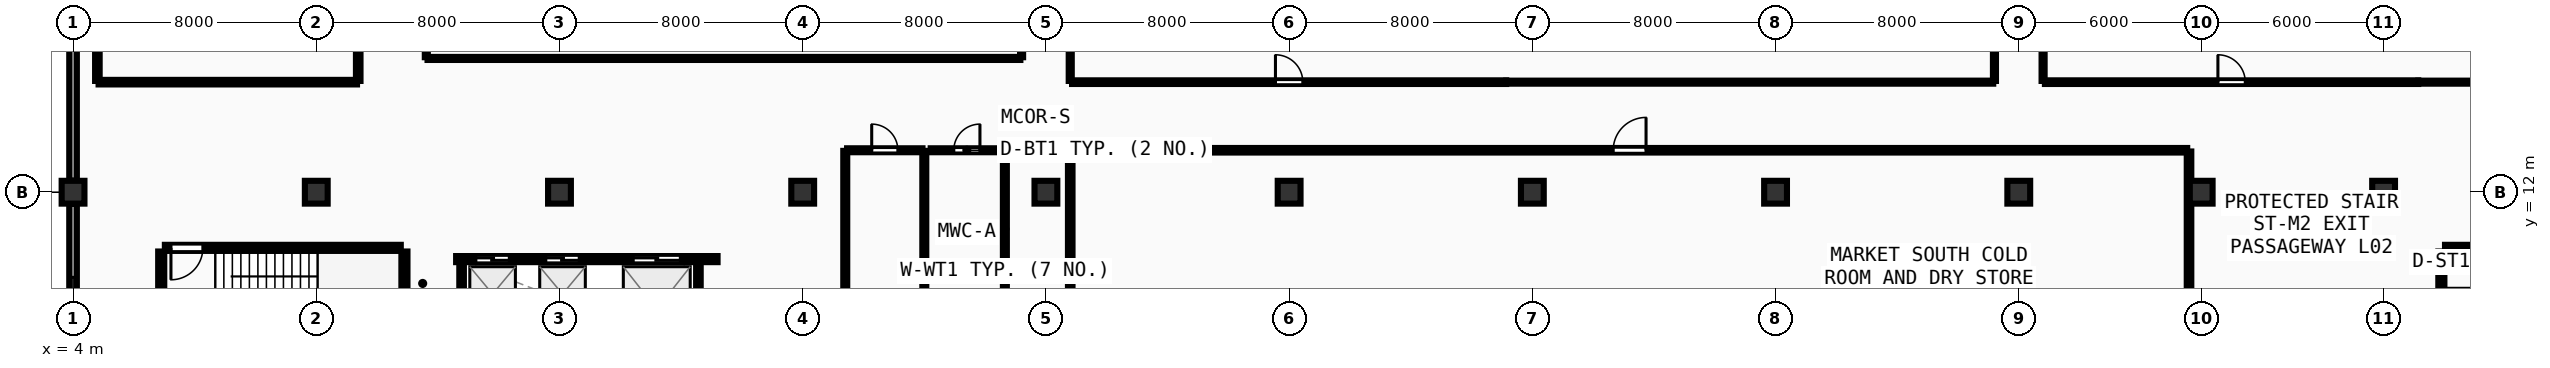
"""IFC4 building model, lengths in metres.
Left out: names, types, materials, properties, quantities, classifications, styles, units other than length and angle.
Written with IfcOpenShell. Run it as: python <this file> out.ifc"""

import sys

from ifc_helpers import new_model, si_unit, direction, frame, frame_2d, origin, origin_2d, place, context, subcontext, project, spatial, rectangle, extrude, element, fill, save


model = new_model("IFC4")
c1 = context("Model", 3, precision=1e-05, world=origin(), true_north=direction((0.0, 1.0)))
c2 = subcontext(c1, "Body", "Model", "MODEL_VIEW")
j1 = project(units=[si_unit("LENGTHUNIT", "METRE"), si_unit("PLANEANGLEUNIT", "RADIAN")], contexts=[c1])
p1 = place(None, origin())
s1 = spatial("IfcSite", under=j1, at=p1, CompositionType="ELEMENT")
p2 = place(p1, origin())
s2 = spatial("IfcBuilding", under=s1, at=p2, CompositionType="ELEMENT")
p3 = place(p2, frame((0.0, 0.0, 9.0)))
s3 = spatial("IfcBuildingStorey", under=s2, at=p3, CompositionType="ELEMENT", Elevation=9.0)
for number, where, z_axis, x_axis in (
    (1, (4.0, 12.0, 0.0), (0.0, 0.0, 1.0), (1.0, 0.0, 0.0)),
    (2, (12.0, 12.0, 0.0), (0.0, 0.0, 1.0), (1.0, 0.0, 0.0)),
    (3, (20.0, 12.0, 0.0), (0.0, 0.0, 1.0), (1.0, 0.0, 0.0)),
    (4, (28.0, 12.0, 0.0), (0.0, 0.0, 1.0), (1.0, 0.0, 0.0)),
    (5, (36.0, 12.0, 0.0), (0.0, 0.0, 1.0), (1.0, 0.0, 0.0)),
    (6, (44.0, 12.0, 0.0), (0.0, 0.0, 1.0), (1.0, 0.0, 0.0)),
    (7, (52.0, 12.0, 0.0), (0.0, 0.0, 1.0), (1.0, 0.0, 0.0)),
    (8, (60.0, 12.0, 0.0), (0.0, 0.0, 1.0), (1.0, 0.0, 0.0)),
    (9, (68.0, 12.0, 0.0), (0.0, 0.0, 1.0), (1.0, 0.0, 0.0)),
    (10, (74.0, 12.0, 0.0), (0.0, 0.0, 1.0), (1.0, 0.0, 0.0)),
    (11, (80.0, 12.0, 0.0), (0.0, 0.0, 1.0), (1.0, 0.0, 0.0)),
):
    element("IfcColumn", number, at=place(p3, frame(where, z_axis=z_axis, x_axis=x_axis)), inside=s3, PredefinedType="COLUMN", context=c2, shape_type="SweptSolid", body=[
        extrude(rectangle(XDim=0.75, YDim=0.75, at=origin_2d()), origin(), (0.0, 0.0, 1.0), 4.5),
    ])
p4 = place(p3, frame((4.0, 19.62, 0.0), z_axis=(0.0, 0.0, 1.0), x_axis=(0.0, -1.0, 0.0)))
e12 = element("IfcWall", 12, at=p4, inside=s3, PredefinedType="SOLIDWALL", context=c2, shape_type="SweptSolid", body=[
    extrude(rectangle(XDim=7.24, YDim=0.25, at=frame_2d((3.62, 0.0))), origin(), (0.0, 0.0, 1.0), 3.42),
])
p5 = place(p3, frame((4.0, 11.62, 0.0), z_axis=(0.0, 0.0, 1.0), x_axis=(0.0, -1.0, 0.0)))
e13 = element("IfcWall", 13, at=p5, inside=s3, PredefinedType="SOLIDWALL", context=c2, shape_type="SweptSolid", body=[
    extrude(rectangle(XDim=7.24, YDim=0.25, at=frame_2d((3.62, 0.0))), origin(), (0.0, 0.0, 1.0), 3.42),
])
p6 = place(p5, frame((2.42, 0.0, 0.95)))
e14 = element("IfcOpeningElement", 14, at=p6, cuts=e13, PredefinedType="OPENING", context=c2, shape_type="SweptSolid", body=[
    extrude(rectangle(XDim=2.4, YDim=1.65, at=frame_2d((1.2, 0.825))), frame((0.0, 0.135, 0.0), z_axis=(0.0, -1.0, 0.0), x_axis=(1.0, 0.0, 0.0)), (0.0, 0.0, 1.0), 0.27),
])
p7 = place(p3, frame((14.9, 6.58, 0.0), z_axis=(0.0, 0.0, 1.0), x_axis=(0.0, 1.0, 0.0)))
e15 = element("IfcWall", 15, at=p7, inside=s3, PredefinedType="SHEAR", context=c2, shape_type="SweptSolid", body=[
    extrude(rectangle(XDim=3.47, YDim=0.2, at=frame_2d((1.735, 0.0))), origin(), (0.0, 0.0, 1.0), 4.24),
])
p8 = place(p3, frame((14.78, 10.17, 0.0), z_axis=(0.0, 0.0, 1.0), x_axis=(-1.0, 0.0, 0.0)))
e16 = element("IfcWall", 16, at=p8, inside=s3, PredefinedType="SHEAR", context=c2, shape_type="SweptSolid", body=[
    extrude(rectangle(XDim=7.76, YDim=0.2, at=frame_2d((3.88, 0.0))), origin(), (0.0, 0.0, 1.0), 4.24),
])
p9 = place(p8, frame((6.51, 0.0, 0.0)))
e17 = element("IfcOpeningElement", 17, at=p9, cuts=e16, PredefinedType="OPENING", context=c2, shape_type="SweptSolid", body=[
    extrude(rectangle(XDim=1.05, YDim=2.1, at=frame_2d((0.525, 1.05))), frame((0.0, 0.11, 0.0), z_axis=(0.0, -1.0, 0.0), x_axis=(1.0, 0.0, 0.0)), (0.0, 0.0, 1.0), 0.22),
])
p10 = place(p3, frame((6.9, 10.05, 0.0), z_axis=(0.0, 0.0, 1.0), x_axis=(0.0, -1.0, 0.0)))
e18 = element("IfcWall", 18, at=p10, inside=s3, PredefinedType="SHEAR", context=c2, shape_type="SweptSolid", body=[
    extrude(rectangle(XDim=3.47, YDim=0.2, at=frame_2d((1.735, 0.0))), origin(), (0.0, 0.0, 1.0), 4.24),
])
p11 = place(p3, frame((89.78, 10.17, 0.0), z_axis=(0.0, 0.0, 1.0), x_axis=(-1.0, 0.0, 0.0)))
e19 = element("IfcWall", 19, at=p11, inside=s3, PredefinedType="SHEAR", context=c2, shape_type="SweptSolid", body=[
    extrude(rectangle(XDim=7.76, YDim=0.2, at=frame_2d((3.88, 0.0))), origin(), (0.0, 0.0, 1.0), 4.24),
])
p12 = place(p3, frame((81.9, 10.05, 0.0), z_axis=(0.0, 0.0, 1.0), x_axis=(0.0, -1.0, 0.0)))
e20 = element("IfcWall", 20, at=p12, inside=s3, PredefinedType="SHEAR", context=c2, shape_type="SweptSolid", body=[
    extrude(rectangle(XDim=3.47, YDim=0.2, at=frame_2d((1.735, 0.0))), origin(), (0.0, 0.0, 1.0), 4.24),
])
p13 = place(p12, frame((1.21, 0.0, 0.0)))
e21 = element("IfcOpeningElement", 21, at=p13, cuts=e20, PredefinedType="OPENING", context=c2, shape_type="SweptSolid", body=[
    extrude(rectangle(XDim=1.05, YDim=2.1, at=frame_2d((0.525, 1.05))), frame((0.0, 0.11, 0.0), z_axis=(0.0, -1.0, 0.0), x_axis=(1.0, 0.0, 0.0)), (0.0, 0.0, 1.0), 0.22),
])
p14 = place(p3, frame((16.6, 9.8, 0.0), z_axis=(0.0, 0.0, 1.0), x_axis=(1.0, 0.0, 0.0)))
e22 = element("IfcWall", 22, at=p14, inside=s3, PredefinedType="SOLIDWALL", context=c2, shape_type="SweptSolid", body=[
    extrude(rectangle(XDim=8.6, YDim=0.2, at=frame_2d((4.3, 0.0))), origin(), (0.0, 0.0, 1.0), 3.425),
])
p15 = place(p14, frame((0.65, 0.0, 0.0)))
e23 = element("IfcOpeningElement", 23, at=p15, cuts=e22, PredefinedType="OPENING", context=c2, shape_type="SweptSolid", body=[
    extrude(rectangle(XDim=1.1, YDim=2.1, at=frame_2d((0.55, 1.05))), frame((0.0, 0.11, 0.0), z_axis=(0.0, -1.0, 0.0), x_axis=(1.0, 0.0, 0.0)), (0.0, 0.0, 1.0), 0.22),
])
p16 = place(p14, frame((2.95, 0.0, 0.0)))
e24 = element("IfcOpeningElement", 24, at=p16, cuts=e22, PredefinedType="OPENING", context=c2, shape_type="SweptSolid", body=[
    extrude(rectangle(XDim=1.1, YDim=2.1, at=frame_2d((0.55, 1.05))), frame((0.0, 0.11, 0.0), z_axis=(0.0, -1.0, 0.0), x_axis=(1.0, 0.0, 0.0)), (0.0, 0.0, 1.0), 0.22),
])
p17 = place(p14, frame((5.825, 0.0, 0.0)))
e25 = element("IfcOpeningElement", 25, at=p17, cuts=e22, PredefinedType="OPENING", context=c2, shape_type="SweptSolid", body=[
    extrude(rectangle(XDim=1.55, YDim=2.2, at=frame_2d((0.775, 1.1))), frame((0.0, 0.11, 0.0), z_axis=(0.0, -1.0, 0.0), x_axis=(1.0, 0.0, 0.0)), (0.0, 0.0, 1.0), 0.22),
])
for number, where, z_axis, x_axis in (
    (26, (16.78, 6.76, 0.0), (0.0, 0.0, 1.0), (0.0, 1.0, 0.0)),
    (27, (24.57, 6.76, 0.0), (0.0, 0.0, 1.0), (0.0, 1.0, 0.0)),
):
    element("IfcWall", number, at=place(p3, frame(where, z_axis=z_axis, x_axis=x_axis)), inside=s3, PredefinedType="PARTITIONING", context=c2, shape_type="SweptSolid", body=[
        extrude(rectangle(XDim=2.91, YDim=0.15, at=frame_2d((1.455, 0.0))), origin(), (0.0, 0.0, 1.0), 4.23),
    ])
p18 = place(p3, frame((29.46, 13.38, 0.0), z_axis=(0.0, 0.0, 1.0), x_axis=(1.0, 0.0, 0.0)))
e28 = element("IfcWall", 28, at=p18, inside=s3, PredefinedType="PLUMBINGWALL", context=c2, shape_type="SweptSolid", body=[
    extrude(rectangle(XDim=2.48, YDim=0.13, at=frame_2d((1.24, 0.0))), origin(), (0.0, 0.0, 1.0), 4.09),
])
p19 = place(p18, frame((0.81, 0.0, 0.0)))
e29 = element("IfcOpeningElement", 29, at=p19, cuts=e28, PredefinedType="OPENING", context=c2, shape_type="SweptSolid", body=[
    extrude(rectangle(XDim=0.86, YDim=2.05, at=frame_2d((0.43, 1.025))), frame((0.0, 0.075, 0.0), z_axis=(0.0, -1.0, 0.0), x_axis=(1.0, 0.0, 0.0)), (0.0, 0.0, 1.0), 0.15),
])
p20 = place(p3, frame((32.21, 13.38, 0.0), z_axis=(0.0, 0.0, 1.0), x_axis=(1.0, 0.0, 0.0)))
e30 = element("IfcWall", 30, at=p20, inside=s3, PredefinedType="PLUMBINGWALL", context=c2, shape_type="SweptSolid", body=[
    extrude(rectangle(XDim=2.38, YDim=0.13, at=frame_2d((1.19, 0.0))), origin(), (0.0, 0.0, 1.0), 4.09),
])
p21 = place(p20, frame((0.76, 0.0, 0.0)))
e31 = element("IfcOpeningElement", 31, at=p21, cuts=e30, PredefinedType="OPENING", context=c2, shape_type="SweptSolid", body=[
    extrude(rectangle(XDim=0.86, YDim=2.05, at=frame_2d((0.43, 1.025))), frame((0.0, 0.075, 0.0), z_axis=(0.0, -1.0, 0.0), x_axis=(1.0, 0.0, 0.0)), (0.0, 0.0, 1.0), 0.15),
])
p22 = place(p3, frame((36.86, 15.62, 0.0), z_axis=(0.0, 0.0, 1.0), x_axis=(1.0, 0.0, 0.0)))
e32 = element("IfcWall", 32, at=p22, inside=s3, PredefinedType="PARTITIONING", context=c2, shape_type="SweptSolid", body=[
    extrude(rectangle(XDim=14.28, YDim=0.12, at=frame_2d((7.14, 0.0))), origin(), (0.0, 0.0, 1.0), 3.425),
])
p23 = place(p22, frame((6.69, 0.0, 0.0)))
e33 = element("IfcOpeningElement", 33, at=p23, cuts=e32, PredefinedType="OPENING", context=c2, shape_type="SweptSolid", body=[
    extrude(rectangle(XDim=0.9, YDim=2.08, at=frame_2d((0.45, 1.04))), frame((0.0, 0.07, 0.0), z_axis=(0.0, -1.0, 0.0), x_axis=(1.0, 0.0, 0.0)), (0.0, 0.0, 1.0), 0.14),
])
p24 = place(p3, frame((36.86, 13.38, 0.0), z_axis=(0.0, 0.0, 1.0), x_axis=(1.0, 0.0, 0.0)))
e34 = element("IfcWall", 34, at=p24, inside=s3, PredefinedType="PARTITIONING", context=c2, shape_type="SweptSolid", body=[
    extrude(rectangle(XDim=36.68, YDim=0.15, at=frame_2d((18.34, 0.0))), origin(), (0.0, 0.0, 1.0), 3.425),
])
p25 = place(p24, frame((17.8, 0.0, 0.0)))
e35 = element("IfcOpeningElement", 35, at=p25, cuts=e34, PredefinedType="OPENING", context=c2, shape_type="SweptSolid", body=[
    extrude(rectangle(XDim=1.08, YDim=2.1, at=frame_2d((0.54, 1.05))), frame((0.0, 0.085, 0.0), z_axis=(0.0, -1.0, 0.0), x_axis=(1.0, 0.0, 0.0)), (0.0, 0.0, 1.0), 0.17),
])
p26 = place(p3, frame((68.86, 15.62, 0.0), z_axis=(0.0, 0.0, 1.0), x_axis=(1.0, 0.0, 0.0)))
e36 = element("IfcWall", 36, at=p26, inside=s3, PredefinedType="PARTITIONING", context=c2, shape_type="SweptSolid", body=[
    extrude(rectangle(XDim=12.28, YDim=0.12, at=frame_2d((6.14, 0.0))), origin(), (0.0, 0.0, 1.0), 3.425),
])
p27 = place(p26, frame((5.69, 0.0, 0.0)))
e37 = element("IfcOpeningElement", 37, at=p27, cuts=e36, PredefinedType="OPENING", context=c2, shape_type="SweptSolid", body=[
    extrude(rectangle(XDim=0.9, YDim=2.08, at=frame_2d((0.45, 1.04))), frame((0.0, 0.07, 0.0), z_axis=(0.0, -1.0, 0.0), x_axis=(1.0, 0.0, 0.0)), (0.0, 0.0, 1.0), 0.14),
])
for number, where, z_axis, x_axis in (
    (38, (32.0, 5.22, 0.0), (0.0, 0.0, 1.0), (0.0, 1.0, 0.0)),
    (39, (29.4, 13.36, 0.0), (0.0, 0.0, 1.0), (0.0, -1.0, 0.0)),
):
    element("IfcWall", number, at=place(p3, frame(where, z_axis=z_axis, x_axis=x_axis)), inside=s3, PredefinedType="PLUMBINGWALL", context=c2, shape_type="SweptSolid", body=[
        extrude(rectangle(XDim=8.14, YDim=0.13, at=frame_2d((4.07, 0.0))), origin(), (0.0, 0.0, 1.0), 3.425),
    ])
p28 = place(p3, frame((34.65, 8.22, 0.0), z_axis=(0.0, 0.0, 1.0), x_axis=(0.0, 1.0, 0.0)))
e40 = element("IfcWall", 40, at=p28, inside=s3, PredefinedType="PLUMBINGWALL", context=c2, shape_type="SweptSolid", body=[
    extrude(rectangle(XDim=5.14, YDim=0.13, at=frame_2d((2.57, 0.0))), origin(), (0.0, 0.0, 1.0), 3.425),
])
p29 = place(p3, frame((51.14, 15.62, 0.0), z_axis=(0.0, 0.0, 1.0), x_axis=(1.0, 0.0, 0.0)))
e41 = element("IfcWall", 41, at=p29, inside=s3, PredefinedType="PARTITIONING", context=c2, shape_type="SweptSolid", body=[
    extrude(rectangle(XDim=16.02, YDim=0.1, at=frame_2d((8.01, 0.0))), origin(), (0.0, 0.0, 1.0), 3.425),
])
for number, where, z_axis, x_axis in (
    (42, (67.2, 15.66, 0.0), (0.0, 0.0, 1.0), (0.0, 1.0, 0.0)),
    (43, (36.8, 25.16, 0.0), (0.0, 0.0, 1.0), (0.0, -1.0, 0.0)),
):
    element("IfcWall", number, at=place(p3, frame(where, z_axis=z_axis, x_axis=x_axis)), inside=s3, PredefinedType="PARTITIONING", context=c2, shape_type="SweptSolid", body=[
        extrude(rectangle(XDim=9.5, YDim=0.1, at=frame_2d((4.75, 0.0))), origin(), (0.0, 0.0, 1.0), 3.425),
    ])
p30 = place(p3, frame((15.66, 16.4, 0.0), z_axis=(0.0, 0.0, 1.0), x_axis=(1.0, 0.0, 0.0)))
e44 = element("IfcWall", 44, at=p30, inside=s3, PredefinedType="PARTITIONING", context=c2, shape_type="SweptSolid", body=[
    extrude(rectangle(XDim=19.5, YDim=0.1, at=frame_2d((9.75, 0.0))), origin(), (0.0, 0.0, 1.0), 3.425),
])
p31 = place(p3, frame((35.2, 16.44, 0.0), z_axis=(0.0, 0.0, 1.0), x_axis=(0.0, 1.0, 0.0)))
e45 = element("IfcWall", 45, at=p31, inside=s3, PredefinedType="PARTITIONING", context=c2, shape_type="SweptSolid", body=[
    extrude(rectangle(XDim=28.32, YDim=0.1, at=frame_2d((14.16, 0.0))), origin(), (0.0, 0.0, 1.0), 3.425),
])
p32 = place(p3, frame((15.62, 21.46, 0.0), z_axis=(0.0, 0.0, 1.0), x_axis=(0.0, -1.0, 0.0)))
e46 = element("IfcWall", 46, at=p32, inside=s3, PredefinedType="PARTITIONING", context=c2, shape_type="SweptSolid", body=[
    extrude(rectangle(XDim=5.02, YDim=0.1, at=frame_2d((2.51, 0.0))), origin(), (0.0, 0.0, 1.0), 3.425),
])
for number, where, z_axis, x_axis in (
    (47, (73.6, 4.84, 0.0), (0.0, 0.0, 1.0), (0.0, 1.0, 0.0)),
    (48, (36.8, 13.34, 0.0), (0.0, 0.0, 1.0), (0.0, -1.0, 0.0)),
):
    element("IfcWall", number, at=place(p3, frame(where, z_axis=z_axis, x_axis=x_axis)), inside=s3, PredefinedType="PARTITIONING", context=c2, shape_type="SweptSolid", body=[
        extrude(rectangle(XDim=8.5, YDim=0.15, at=frame_2d((4.25, 0.0))), origin(), (0.0, 0.0, 1.0), 3.425),
    ])
p33 = place(p3, frame((81.14, 15.62, 0.0), z_axis=(0.0, 0.0, 1.0), x_axis=(1.0, 0.0, 0.0)))
e49 = element("IfcWall", 49, at=p33, inside=s3, PredefinedType="PARTITIONING", context=c2, shape_type="SweptSolid", body=[
    extrude(rectangle(XDim=14.02, YDim=0.1, at=frame_2d((7.01, 0.0))), origin(), (0.0, 0.0, 1.0), 3.425),
])
p34 = place(p3, frame((68.8, 25.16, 0.0), z_axis=(0.0, 0.0, 1.0), x_axis=(0.0, -1.0, 0.0)))
e50 = element("IfcWall", 50, at=p34, inside=s3, PredefinedType="PARTITIONING", context=c2, shape_type="SweptSolid", body=[
    extrude(rectangle(XDim=9.5, YDim=0.1, at=frame_2d((4.75, 0.0))), origin(), (0.0, 0.0, 1.0), 3.425),
])
p35 = place(p3, frame((4.84, 15.62, 0.0), z_axis=(0.0, 0.0, 1.0), x_axis=(1.0, 0.0, 0.0)))
e51 = element("IfcWall", 51, at=p35, inside=s3, PredefinedType="PARTITIONING", context=c2, shape_type="SweptSolid", body=[
    extrude(rectangle(XDim=8.5, YDim=0.15, at=frame_2d((4.25, 0.0))), origin(), (0.0, 0.0, 1.0), 3.425),
])
p36 = place(p3, frame((13.38, 15.66, 0.0), z_axis=(0.0, 0.0, 1.0), x_axis=(0.0, 1.0, 0.0)))
e52 = element("IfcWall", 52, at=p36, inside=s3, PredefinedType="PARTITIONING", context=c2, shape_type="SweptSolid", body=[
    extrude(rectangle(XDim=5.8, YDim=0.15, at=frame_2d((2.9, 0.0))), origin(), (0.0, 0.0, 1.0), 3.425),
])
p37 = place(p3, frame((4.8, 65.16, 0.0), z_axis=(0.0, 0.0, 1.0), x_axis=(0.0, -1.0, 0.0)))
e53 = element("IfcWall", 53, at=p37, inside=s3, PredefinedType="PARTITIONING", context=c2, shape_type="SweptSolid", body=[
    extrude(rectangle(XDim=49.5, YDim=0.15, at=frame_2d((24.75, 0.0))), origin(), (0.0, 0.0, 1.0), 3.425),
])
p38 = place(p6, origin())
e54 = element("IfcWindow", 54, at=p38, inside=s3, PartitioningType="SINGLE_PANEL", PredefinedType="WINDOW", context=c2, shape_type="SweptSolid", body=[
    extrude(rectangle(XDim=2.4, YDim=1.65, at=frame_2d((1.2, 0.825))), frame((0.0, 0.03, 0.0), z_axis=(0.0, -1.0, 0.0), x_axis=(1.0, 0.0, 0.0)), (0.0, 0.0, 1.0), 0.06),
])
fill(e14, e54)
p39 = place(p9, origin())
e55 = element("IfcDoor", 55, at=p39, inside=s3, OperationType="SINGLE_SWING_RIGHT", PredefinedType="DOOR", context=c2, shape_type="SweptSolid", body=[
    extrude(rectangle(XDim=1.05, YDim=2.1, at=frame_2d((0.525, 1.05))), frame((0.0, 0.025, 0.0), z_axis=(0.0, -1.0, 0.0), x_axis=(1.0, 0.0, 0.0)), (0.0, 0.0, 1.0), 0.05),
])
fill(e17, e55)
p40 = place(p15, origin())
e56 = element("IfcDoor", 56, at=p40, inside=s3, OperationType="DOUBLE_DOOR_SLIDING", PredefinedType="DOOR", context=c2, shape_type="SweptSolid", body=[
    extrude(rectangle(XDim=1.1, YDim=2.1, at=frame_2d((0.55, 1.05))), frame((0.0, 0.025, 0.0), z_axis=(0.0, -1.0, 0.0), x_axis=(1.0, 0.0, 0.0)), (0.0, 0.0, 1.0), 0.05),
])
fill(e23, e56)
p41 = place(p16, origin())
e57 = element("IfcDoor", 57, at=p41, inside=s3, OperationType="DOUBLE_DOOR_SLIDING", PredefinedType="DOOR", context=c2, shape_type="SweptSolid", body=[
    extrude(rectangle(XDim=1.1, YDim=2.1, at=frame_2d((0.55, 1.05))), frame((0.0, 0.025, 0.0), z_axis=(0.0, -1.0, 0.0), x_axis=(1.0, 0.0, 0.0)), (0.0, 0.0, 1.0), 0.05),
])
fill(e24, e57)
p42 = place(p17, origin())
e58 = element("IfcDoor", 58, at=p42, inside=s3, OperationType="DOUBLE_DOOR_SLIDING", PredefinedType="DOOR", context=c2, shape_type="SweptSolid", body=[
    extrude(rectangle(XDim=1.55, YDim=2.2, at=frame_2d((0.775, 1.1))), frame((0.0, 0.025, 0.0), z_axis=(0.0, -1.0, 0.0), x_axis=(1.0, 0.0, 0.0)), (0.0, 0.0, 1.0), 0.05),
])
fill(e25, e58)
p43 = place(p19, origin())
e59 = element("IfcDoor", 59, at=p43, inside=s3, OperationType="SINGLE_SWING_LEFT", PredefinedType="DOOR", context=c2, shape_type="SweptSolid", body=[
    extrude(rectangle(XDim=0.86, YDim=2.05, at=frame_2d((0.43, 1.025))), frame((0.0, 0.025, 0.0), z_axis=(0.0, -1.0, 0.0), x_axis=(1.0, 0.0, 0.0)), (0.0, 0.0, 1.0), 0.05),
])
fill(e29, e59)
p44 = place(p21, origin())
e60 = element("IfcDoor", 60, at=p44, inside=s3, OperationType="SINGLE_SWING_RIGHT", PredefinedType="DOOR", context=c2, shape_type="SweptSolid", body=[
    extrude(rectangle(XDim=0.86, YDim=2.05, at=frame_2d((0.43, 1.025))), frame((0.0, 0.025, 0.0), z_axis=(0.0, -1.0, 0.0), x_axis=(1.0, 0.0, 0.0)), (0.0, 0.0, 1.0), 0.05),
])
fill(e31, e60)
p45 = place(p23, origin())
e61 = element("IfcDoor", 61, at=p45, inside=s3, OperationType="SINGLE_SWING_LEFT", PredefinedType="DOOR", context=c2, shape_type="SweptSolid", body=[
    extrude(rectangle(XDim=0.9, YDim=2.08, at=frame_2d((0.45, 1.04))), frame((0.0, 0.025, 0.0), z_axis=(0.0, -1.0, 0.0), x_axis=(1.0, 0.0, 0.0)), (0.0, 0.0, 1.0), 0.05),
])
fill(e33, e61)
p46 = place(p25, origin())
e62 = element("IfcDoor", 62, at=p46, inside=s3, OperationType="SINGLE_SWING_RIGHT", PredefinedType="DOOR", context=c2, shape_type="SweptSolid", body=[
    extrude(rectangle(XDim=1.08, YDim=2.1, at=frame_2d((0.54, 1.05))), frame((0.0, 0.025, 0.0), z_axis=(0.0, -1.0, 0.0), x_axis=(1.0, 0.0, 0.0)), (0.0, 0.0, 1.0), 0.05),
])
fill(e35, e62)
p47 = place(p27, origin())
e63 = element("IfcDoor", 63, at=p47, inside=s3, OperationType="SINGLE_SWING_LEFT", PredefinedType="DOOR", context=c2, shape_type="SweptSolid", body=[
    extrude(rectangle(XDim=0.9, YDim=2.08, at=frame_2d((0.45, 1.04))), frame((0.0, 0.025, 0.0), z_axis=(0.0, -1.0, 0.0), x_axis=(1.0, 0.0, 0.0)), (0.0, 0.0, 1.0), 0.05),
])
fill(e37, e63)
save(model, sys.argv[1])
